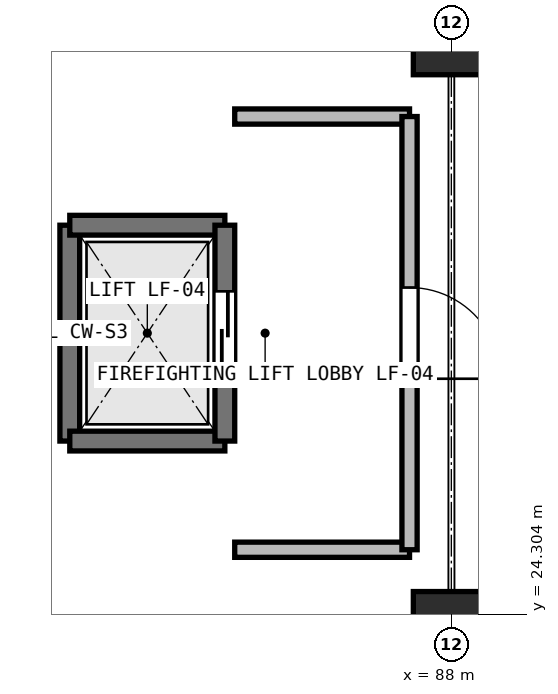
"""IFC4 building model, lengths in metres.
Left out: names, types, materials, properties, quantities, classifications, styles, units other than length and angle.
Written with IfcOpenShell. Run it as: python <this file> out.ifc"""

import sys

from ifc_helpers import new_model, si_unit, direction, frame, frame_2d, origin, origin_2d, place, context, subcontext, project, spatial, rectangle, extrude, element, fill, save


model = new_model("IFC4")
c1 = context("Model", 3, precision=1e-05, world=origin(), true_north=direction((0.0, 1.0)))
c2 = subcontext(c1, "Body", "Model", "MODEL_VIEW")
j1 = project(units=[si_unit("LENGTHUNIT", "METRE"), si_unit("PLANEANGLEUNIT", "RADIAN")], contexts=[c1])
p1 = place(None, origin())
s1 = spatial("IfcSite", under=j1, at=p1, CompositionType="ELEMENT")
p2 = place(p1, origin())
s2 = spatial("IfcBuilding", under=s1, at=p2, CompositionType="ELEMENT")
p3 = place(p2, frame((0.0, 0.0, 24.6)))
s3 = spatial("IfcBuildingStorey", under=s2, at=p3, CompositionType="ELEMENT", Elevation=24.6)
for number, where, z_axis, x_axis in (
    (1, (88.0, 24.0, 0.0), (0.0, 0.0, 1.0), (1.0, 0.0, 0.0)),
    (2, (88.0, 32.0, 0.0), (0.0, 0.0, 1.0), (1.0, 0.0, 0.0)),
):
    element("IfcColumn", number, at=place(p3, frame(where, z_axis=z_axis, x_axis=x_axis)), inside=s3, PredefinedType="COLUMN", context=c2, shape_type="SweptSolid", body=[
        extrude(rectangle(XDim=1.0, YDim=1.2, at=origin_2d()), origin(), (0.0, 0.0, 1.0), 4.8),
    ])
p4 = place(p3, frame((82.98, 26.58, 0.0), z_axis=(0.0, 0.0, 1.0), x_axis=(0.0, 1.0, 0.0)))
e3 = element("IfcWall", 3, at=p4, inside=s3, PredefinedType="SHEAR", context=c2, shape_type="SweptSolid", body=[
    extrude(rectangle(XDim=2.84, YDim=0.26, at=frame_2d((1.42, 0.0))), origin(), (0.0, 0.0, 1.0), 4.55),
])
for number, where, z_axis, x_axis in (
    (4, (82.98, 29.42, 0.0), (0.0, 0.0, 1.0), (1.0, 0.0, 0.0)),
    (5, (85.02, 26.58, 0.0), (0.0, 0.0, 1.0), (-1.0, 0.0, 0.0)),
):
    element("IfcWall", number, at=place(p3, frame(where, z_axis=z_axis, x_axis=x_axis)), inside=s3, PredefinedType="SHEAR", context=c2, shape_type="SweptSolid", body=[
        extrude(rectangle(XDim=2.04, YDim=0.26, at=frame_2d((1.02, 0.0))), origin(), (0.0, 0.0, 1.0), 4.55),
    ])
p5 = place(p3, frame((85.02, 29.42, 0.0), z_axis=(0.0, 0.0, 1.0), x_axis=(0.0, -1.0, 0.0)))
e6 = element("IfcWall", 6, at=p5, inside=s3, PredefinedType="SHEAR", context=c2, shape_type="SweptSolid", body=[
    extrude(rectangle(XDim=2.84, YDim=0.26, at=frame_2d((1.42, 0.0))), origin(), (0.0, 0.0, 1.0), 4.55),
])
p6 = place(p5, frame((0.87, 0.0, 0.0)))
e7 = element("IfcOpeningElement", 7, at=p6, cuts=e6, PredefinedType="OPENING", context=c2, shape_type="SweptSolid", body=[
    extrude(rectangle(XDim=1.1, YDim=2.15, at=frame_2d((0.55, 1.075))), frame((0.0, 0.14, 0.0), z_axis=(0.0, -1.0, 0.0), x_axis=(1.0, 0.0, 0.0)), (0.0, 0.0, 1.0), 0.28),
])
for number, where, z_axis, x_axis in (
    (8, (85.15, 30.85, 0.0), (0.0, 0.0, 1.0), (1.0, 0.0, 0.0)),
    (9, (87.45, 25.15, 0.0), (0.0, 0.0, 1.0), (-1.0, 0.0, 0.0)),
):
    element("IfcWall", number, at=place(p3, frame(where, z_axis=z_axis, x_axis=x_axis)), inside=s3, PredefinedType="PARTITIONING", context=c2, shape_type="SweptSolid", body=[
        extrude(rectangle(XDim=2.3, YDim=0.2, at=frame_2d((1.15, 0.0))), origin(), (0.0, 0.0, 1.0), 4.55),
    ])
p7 = place(p3, frame((87.45, 30.85, 0.0), z_axis=(0.0, 0.0, 1.0), x_axis=(0.0, -1.0, 0.0)))
e10 = element("IfcWall", 10, at=p7, inside=s3, PredefinedType="PARTITIONING", context=c2, shape_type="SweptSolid", body=[
    extrude(rectangle(XDim=5.7, YDim=0.2, at=frame_2d((2.85, 0.0))), origin(), (0.0, 0.0, 1.0), 3.71),
])
p8 = place(p7, frame((2.25, 0.0, 0.0)))
e11 = element("IfcOpeningElement", 11, at=p8, cuts=e10, PredefinedType="OPENING", context=c2, shape_type="SweptSolid", body=[
    extrude(rectangle(XDim=1.2, YDim=2.2, at=frame_2d((0.6, 1.1))), frame((0.0, 0.11, 0.0), z_axis=(0.0, -1.0, 0.0), x_axis=(1.0, 0.0, 0.0)), (0.0, 0.0, 1.0), 0.22),
])
p9 = place(p6, origin())
e12 = element("IfcDoor", 12, at=p9, inside=s3, OperationType="SLIDING_TO_LEFT", PredefinedType="DOOR", context=c2, shape_type="SweptSolid", body=[
    extrude(rectangle(XDim=1.1, YDim=2.15, at=frame_2d((0.55, 1.075))), frame((0.0, 0.025, 0.0), z_axis=(0.0, -1.0, 0.0), x_axis=(1.0, 0.0, 0.0)), (0.0, 0.0, 1.0), 0.05),
])
fill(e7, e12)
p10 = place(p8, origin())
e13 = element("IfcDoor", 13, at=p10, inside=s3, OperationType="SINGLE_SWING_RIGHT", PredefinedType="DOOR", context=c2, shape_type="SweptSolid", body=[
    extrude(rectangle(XDim=1.2, YDim=2.2, at=frame_2d((0.6, 1.1))), frame((0.0, 0.025, 0.0), z_axis=(0.0, -1.0, 0.0), x_axis=(1.0, 0.0, 0.0)), (0.0, 0.0, 1.0), 0.05),
])
fill(e11, e13)
save(model, sys.argv[1])
